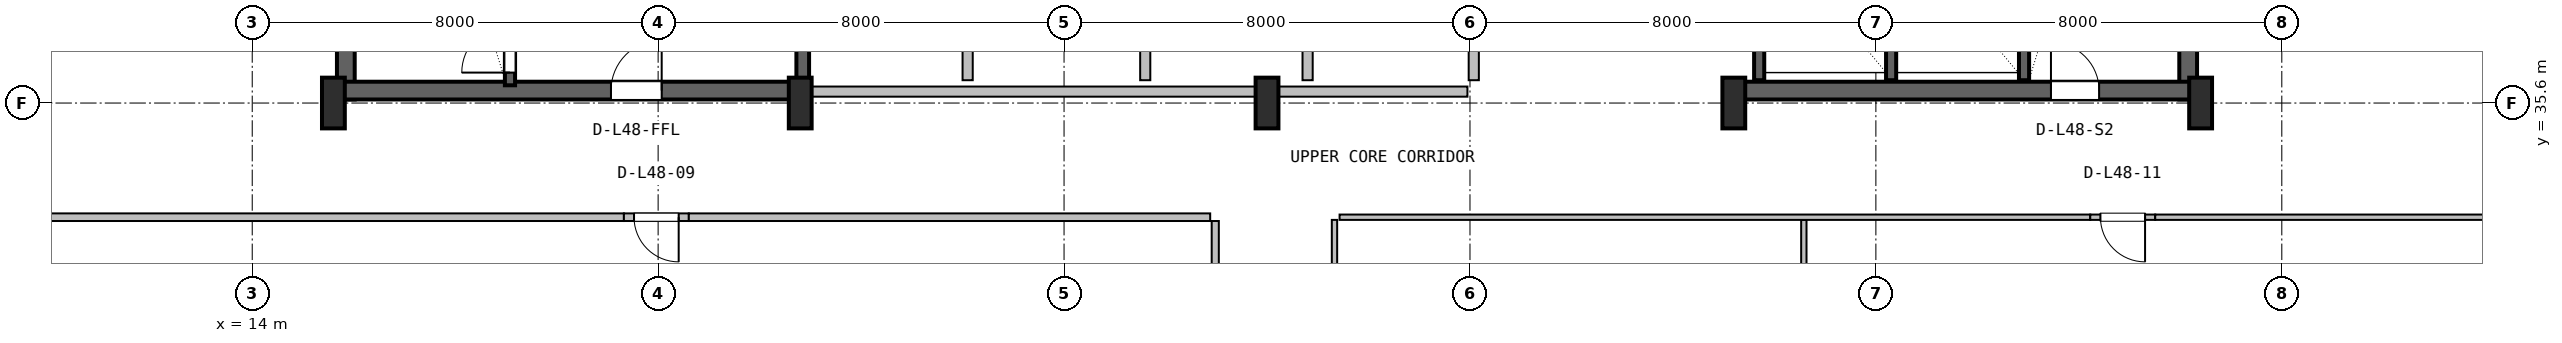
"""IFC4 building model, lengths in metres.
Left out: names, types, materials, properties, quantities, classifications, styles, units other than length and angle.
Written with IfcOpenShell. Run it as: python <this file> out.ifc"""

import sys

from ifc_helpers import new_model, si_unit, direction, frame, frame_2d, origin, origin_2d, place, context, subcontext, project, spatial, rectangle, i_section, extrude, source, transform, mapped, element, fill, save


model = new_model("IFC4")
c1 = context("Model", 3, precision=1e-05, world=origin(), true_north=direction((0.0, 1.0)))
c2 = subcontext(c1, "Body", "Model", "MODEL_VIEW")
j1 = project(units=[si_unit("LENGTHUNIT", "METRE"), si_unit("PLANEANGLEUNIT", "RADIAN")], contexts=[c1])
p1 = place(None, origin())
s1 = spatial("IfcSite", under=j1, at=p1, CompositionType="ELEMENT")
p2 = place(p1, origin())
s2 = spatial("IfcBuilding", under=s1, at=p2, CompositionType="ELEMENT")
p3 = place(p2, frame((0.0, 0.0, 196.0)))
s3 = spatial("IfcBuildingStorey", under=s2, at=p3, CompositionType="ELEMENT", Elevation=196.0)
for number, where, z_axis, x_axis in (
    (1, (15.845, 35.67, 0.0), (0.0, 0.0, 1.0), (0.0, 1.0, 0.0)),
    (2, (52.155, 35.67, 0.0), (0.0, 0.0, 1.0), (0.0, 1.0, 0.0)),
):
    element("IfcWall", number, at=place(p3, frame(where, z_axis=z_axis, x_axis=x_axis)), inside=s3, PredefinedType="SHEAR", context=c2, shape_type="SweptSolid", body=[
        extrude(rectangle(XDim=11.13, YDim=0.35, at=frame_2d((5.565, 0.0))), origin(), (0.0, 0.0, 1.0), 3.55),
    ])
p4 = place(p3, frame((15.67, 35.845, 0.0), z_axis=(0.0, 0.0, 1.0), x_axis=(1.0, 0.0, 0.0)))
e3 = element("IfcWall", 3, at=p4, inside=s3, PredefinedType="SHEAR", context=c2, shape_type="SweptSolid", body=[
    extrude(rectangle(XDim=9.13, YDim=0.35, at=frame_2d((4.565, 0.0))), origin(), (0.0, 0.0, 1.0), 3.55),
])
p5 = place(p4, frame((5.4, 0.0, 0.0)))
e4 = element("IfcOpeningElement", 4, at=p5, cuts=e3, PredefinedType="OPENING", context=c2, shape_type="SweptSolid", body=[
    extrude(rectangle(XDim=1.0, YDim=2.1, at=frame_2d((0.5, 1.05))), frame((0.0, 0.185, 0.0), z_axis=(0.0, -1.0, 0.0), x_axis=(1.0, 0.0, 0.0)), (0.0, 0.0, 1.0), 0.37),
])
p6 = place(p3, frame((43.2, 35.845, 0.0), z_axis=(0.0, 0.0, 1.0), x_axis=(1.0, 0.0, 0.0)))
e5 = element("IfcWall", 5, at=p6, inside=s3, PredefinedType="SHEAR", context=c2, shape_type="SweptSolid", body=[
    extrude(rectangle(XDim=9.13, YDim=0.35, at=frame_2d((4.565, 0.0))), origin(), (0.0, 0.0, 1.0), 3.55),
])
p7 = place(p6, frame((6.25, 0.0, 0.0)))
e6 = element("IfcOpeningElement", 6, at=p7, cuts=e5, PredefinedType="OPENING", context=c2, shape_type="SweptSolid", body=[
    extrude(rectangle(XDim=0.95, YDim=2.1, at=frame_2d((0.475, 1.05))), frame((0.0, 0.185, 0.0), z_axis=(0.0, -1.0, 0.0), x_axis=(1.0, 0.0, 0.0)), (0.0, 0.0, 1.0), 0.37),
])
m1 = source(origin(), c2, "Body", "SweptSolid", [
    extrude(i_section(OverallWidth=0.45, OverallDepth=1.0, WebThickness=0.016, FlangeThickness=0.03, FilletRadius=0.016, at=origin_2d()), origin(), (0.0, 0.0, 1.0), 3.8),
])
for number, where, z_axis, x_axis in (
    (7, (15.6, 35.6, 0.0), (0.0, 0.0, 1.0), (1.0, 0.0, 0.0)),
    (8, (24.8, 35.6, 0.0), (0.0, 0.0, 1.0), (1.0, 0.0, 0.0)),
    (9, (34.0, 35.6, 0.0), (0.0, 0.0, 1.0), (1.0, 0.0, 0.0)),
    (10, (43.2, 35.6, 0.0), (0.0, 0.0, 1.0), (1.0, 0.0, 0.0)),
    (11, (52.4, 35.6, 0.0), (0.0, 0.0, 1.0), (1.0, 0.0, 0.0)),
):
    element("IfcColumn", number, at=place(p3, frame(where, z_axis=z_axis, x_axis=x_axis)), inside=s3, PredefinedType="COLUMN", context=c2, shape_type="MappedRepresentation", body=[
        mapped(m1, transform((0.0, 0.0, 0.0), x_axis=(1.0, 0.0, 0.0), y_axis=(0.0, 1.0, 0.0), z_axis=(0.0, 0.0, 1.0), scale=1.0)),
    ])
p8 = place(p3, frame((19.08, 35.95, 0.0), z_axis=(0.0, 0.0, 1.0), x_axis=(0.0, 1.0, 0.0)))
e12 = element("IfcWall", 12, at=p8, inside=s3, PredefinedType="SHEAR", context=c2, shape_type="SweptSolid", body=[
    extrude(rectangle(XDim=9.65, YDim=0.2, at=frame_2d((4.825, 0.0))), origin(), (0.0, 0.0, 1.0), 3.55),
])
p9 = place(p8, frame((0.25, 0.0, 0.0)))
e13 = element("IfcOpeningElement", 13, at=p9, cuts=e12, PredefinedType="OPENING", context=c2, shape_type="SweptSolid", body=[
    extrude(rectangle(XDim=0.95, YDim=2.1, at=frame_2d((0.475, 1.05))), frame((0.0, 0.11, 0.0), z_axis=(0.0, -1.0, 0.0), x_axis=(1.0, 0.0, 0.0)), (0.0, 0.0, 1.0), 0.22),
])
p10 = place(p3, frame((24.85, 36.05, 0.0), z_axis=(0.0, 0.0, 1.0), x_axis=(0.0, 1.0, 0.0)))
e14 = element("IfcWall", 14, at=p10, inside=s3, PredefinedType="SHEAR", context=c2, shape_type="SweptSolid", body=[
    extrude(rectangle(XDim=10.45, YDim=0.25, at=frame_2d((5.225, 0.0))), origin(), (0.0, 0.0, 1.0), 3.55),
])
p11 = place(p3, frame((48.92, 36.05, 0.0), z_axis=(0.0, 0.0, 1.0), x_axis=(0.0, 1.0, 0.0)))
e15 = element("IfcWall", 15, at=p11, inside=s3, PredefinedType="SHEAR", context=c2, shape_type="SweptSolid", body=[
    extrude(rectangle(XDim=10.5, YDim=0.2, at=frame_2d((5.25, 0.0))), origin(), (0.0, 0.0, 1.0), 3.55),
])
for number, where, z_axis, x_axis in (
    (16, (43.7, 36.05, 0.0), (0.0, 0.0, 1.0), (0.0, 1.0, 0.0)),
    (17, (46.3, 36.05, 0.0), (0.0, 0.0, 1.0), (0.0, 1.0, 0.0)),
):
    element("IfcWall", number, at=place(p3, frame(where, z_axis=z_axis, x_axis=x_axis)), inside=s3, PredefinedType="SHEAR", context=c2, shape_type="SweptSolid", body=[
        extrude(rectangle(XDim=3.05, YDim=0.2, at=frame_2d((1.525, 0.0))), origin(), (0.0, 0.0, 1.0), 3.55),
    ])
p12 = place(p3, frame((25.0, 35.825, 0.0), z_axis=(0.0, 0.0, 1.0), x_axis=(1.0, 0.0, 0.0)))
e18 = element("IfcWall", 18, at=p12, inside=s3, PredefinedType="SOLIDWALL", context=c2, shape_type="SweptSolid", body=[
    extrude(rectangle(XDim=12.95, YDim=0.2, at=frame_2d((6.475, 0.0))), origin(), (0.0, 0.0, 1.0), 2.575),
])
for number, where, z_axis, x_axis in (
    (19, (28.1, 36.05, 0.0), (0.0, 0.0, 1.0), (0.0, 1.0, 0.0)),
    (20, (31.6, 36.05, 0.0), (0.0, 0.0, 1.0), (0.0, 1.0, 0.0)),
):
    element("IfcWall", number, at=place(p3, frame(where, z_axis=z_axis, x_axis=x_axis)), inside=s3, PredefinedType="PLUMBINGWALL", context=c2, shape_type="SweptSolid", body=[
        extrude(rectangle(XDim=3.1, YDim=0.2, at=frame_2d((1.55, 0.0))), origin(), (0.0, 0.0, 1.0), 3.53),
    ])
for number, where, z_axis, x_axis in (
    (21, (34.8, 36.05, 0.0), (0.0, 0.0, 1.0), (0.0, 1.0, 0.0)),
    (22, (38.075, 36.05, 0.0), (0.0, 0.0, 1.0), (0.0, 1.0, 0.0)),
):
    element("IfcWall", number, at=place(p3, frame(where, z_axis=z_axis, x_axis=x_axis)), inside=s3, PredefinedType="SOLIDWALL", context=c2, shape_type="SweptSolid", body=[
        extrude(rectangle(XDim=3.1, YDim=0.2, at=frame_2d((1.55, 0.0))), origin(), (0.0, 0.0, 1.0), 3.53),
    ])
p13 = place(p3, frame((32.98, 16.38, 0.0), z_axis=(0.0, 0.0, 1.0), x_axis=(0.0, 1.0, 0.0)))
e23 = element("IfcWall", 23, at=p13, inside=s3, PredefinedType="PARTITIONING", context=c2, shape_type="SweptSolid", body=[
    extrude(rectangle(XDim=16.895, YDim=0.14, at=frame_2d((8.448, 0.0))), origin(), (0.0, 0.0, 1.0), 1.925),
])
p14 = place(p3, frame((7.18, 33.35, 0.0), z_axis=(0.0, 0.0, 1.0), x_axis=(1.0, 0.0, 0.0)))
e24 = element("IfcWall", 24, at=p14, inside=s3, PredefinedType="PARTITIONING", context=c2, shape_type="SweptSolid", body=[
    extrude(rectangle(XDim=14.145, YDim=0.15, at=frame_2d((7.073, 0.0))), origin(), (0.0, 0.0, 1.0), 1.925),
])
p15 = place(p3, frame((21.325, 33.35, 0.0), z_axis=(0.0, 0.0, 1.0), x_axis=(1.0, 0.0, 0.0)))
e25 = element("IfcWall", 25, at=p15, inside=s3, PredefinedType="PARTITIONING", context=c2, shape_type="SweptSolid", body=[
    extrude(rectangle(XDim=1.28, YDim=0.15, at=frame_2d((0.64, 0.0))), origin(), (0.0, 0.0, 1.0), 3.53),
])
p16 = place(p15, frame((0.2, 0.0, 0.0)))
e26 = element("IfcOpeningElement", 26, at=p16, cuts=e25, PredefinedType="OPENING", context=c2, shape_type="SweptSolid", body=[
    extrude(rectangle(XDim=0.88, YDim=2.06, at=frame_2d((0.44, 1.03))), frame((0.0, 0.085, 0.0), z_axis=(0.0, -1.0, 0.0), x_axis=(1.0, 0.0, 0.0)), (0.0, 0.0, 1.0), 0.17),
])
p17 = place(p3, frame((22.605, 33.35, 0.0), z_axis=(0.0, 0.0, 1.0), x_axis=(1.0, 0.0, 0.0)))
e27 = element("IfcWall", 27, at=p17, inside=s3, PredefinedType="PARTITIONING", context=c2, shape_type="SweptSolid", body=[
    extrude(rectangle(XDim=10.275, YDim=0.15, at=frame_2d((5.137, 0.0))), origin(), (0.0, 0.0, 1.0), 2.195),
])
p18 = place(p3, frame((44.58, 7.38, 0.0), z_axis=(0.0, 0.0, 1.0), x_axis=(0.0, 1.0, 0.0)))
e28 = element("IfcWall", 28, at=p18, inside=s3, PredefinedType="PARTITIONING", context=c2, shape_type="SweptSolid", body=[
    extrude(rectangle(XDim=25.917, YDim=0.105, at=frame_2d((12.958, 0.0))), origin(), (0.0, 0.0, 1.0), 1.925),
])
p19 = place(p3, frame((35.43, 33.35, 0.0), z_axis=(0.0, 0.0, 1.0), x_axis=(1.0, 0.0, 0.0)))
e29 = element("IfcWall", 29, at=p19, inside=s3, PredefinedType="PARTITIONING", context=c2, shape_type="SweptSolid", body=[
    extrude(rectangle(XDim=14.795, YDim=0.105, at=frame_2d((7.397, 0.0))), origin(), (0.0, 0.0, 1.0), 2.195),
])
p20 = place(p3, frame((50.225, 33.35, 0.0), z_axis=(0.0, 0.0, 1.0), x_axis=(1.0, 0.0, 0.0)))
e30 = element("IfcWall", 30, at=p20, inside=s3, PredefinedType="PARTITIONING", context=c2, shape_type="SweptSolid", body=[
    extrude(rectangle(XDim=1.28, YDim=0.105, at=frame_2d((0.64, 0.0))), origin(), (0.0, 0.0, 1.0), 2.195),
])
p21 = place(p20, frame((0.2, 0.0, 0.0)))
e31 = element("IfcOpeningElement", 31, at=p21, cuts=e30, PredefinedType="OPENING", context=c2, shape_type="SweptSolid", body=[
    extrude(rectangle(XDim=0.88, YDim=2.06, at=frame_2d((0.44, 1.03))), frame((0.0, 0.062, 0.0), z_axis=(0.0, -1.0, 0.0), x_axis=(1.0, 0.0, 0.0)), (0.0, 0.0, 1.0), 0.125),
])
p22 = place(p3, frame((51.505, 33.35, 0.0), z_axis=(0.0, 0.0, 1.0), x_axis=(1.0, 0.0, 0.0)))
e32 = element("IfcWall", 32, at=p22, inside=s3, PredefinedType="PARTITIONING", context=c2, shape_type="SweptSolid", body=[
    extrude(rectangle(XDim=9.315, YDim=0.105, at=frame_2d((4.658, 0.0))), origin(), (0.0, 0.0, 1.0), 1.925),
])
p23 = place(p3, frame((35.33, 21.46, 0.0), z_axis=(0.0, 0.0, 1.0), x_axis=(0.0, 1.0, 0.0)))
e33 = element("IfcWall", 33, at=p23, inside=s3, PredefinedType="PARTITIONING", context=c2, shape_type="SweptSolid", body=[
    extrude(rectangle(XDim=11.837, YDim=0.105, at=frame_2d((5.918, 0.0))), origin(), (0.0, 0.0, 1.0), 1.925),
])
m2 = source(origin(), c2, "Body", "SweptSolid", [
    extrude(rectangle(XDim=0.95, YDim=2.1, at=frame_2d((0.475, 1.05))), frame((0.0, 0.025, 0.0), z_axis=(0.0, -1.0, 0.0), x_axis=(1.0, 0.0, 0.0)), (0.0, 0.0, 1.0), 0.05),
])
p24 = place(p9, origin())
e34 = element("IfcDoor", 34, at=p24, inside=s3, OperationType="SINGLE_SWING_LEFT", PredefinedType="DOOR", context=c2, shape_type="MappedRepresentation", body=[
    mapped(m2, transform((0.0, 0.0, 0.0), x_axis=(1.0, 0.0, 0.0), y_axis=(0.0, 1.0, 0.0), z_axis=(0.0, 0.0, 1.0), scale=1.0)),
])
fill(e13, e34)
m3 = source(origin(), c2, "Body", "SweptSolid", [
    extrude(rectangle(XDim=1.0, YDim=2.1, at=frame_2d((0.5, 1.05))), frame((0.0, 0.025, 0.0), z_axis=(0.0, -1.0, 0.0), x_axis=(1.0, 0.0, 0.0)), (0.0, 0.0, 1.0), 0.05),
])
p25 = place(p5, origin())
e35 = element("IfcDoor", 35, at=p25, inside=s3, OperationType="SINGLE_SWING_RIGHT", PredefinedType="DOOR", context=c2, shape_type="MappedRepresentation", body=[
    mapped(m3, transform((0.0, 0.0, 0.0), x_axis=(1.0, 0.0, 0.0), y_axis=(0.0, 1.0, 0.0), z_axis=(0.0, 0.0, 1.0), scale=1.0)),
])
fill(e4, e35)
p26 = place(p7, origin())
e36 = element("IfcDoor", 36, at=p26, inside=s3, OperationType="SINGLE_SWING_LEFT", PredefinedType="DOOR", context=c2, shape_type="MappedRepresentation", body=[
    mapped(m2, transform((0.0, 0.0, 0.0), x_axis=(1.0, 0.0, 0.0), y_axis=(0.0, 1.0, 0.0), z_axis=(0.0, 0.0, 1.0), scale=1.0)),
])
fill(e6, e36)
m4 = source(origin(), c2, "Body", "SweptSolid", [
    extrude(rectangle(XDim=0.88, YDim=2.06, at=frame_2d((0.44, 1.03))), frame((0.0, 0.025, 0.0), z_axis=(0.0, -1.0, 0.0), x_axis=(1.0, 0.0, 0.0)), (0.0, 0.0, 1.0), 0.05),
])
p27 = place(p16, frame((0.88, 0.0, 0.0), z_axis=(0.0, 0.0, 1.0), x_axis=(-1.0, 0.0, 0.0)))
e37 = element("IfcDoor", 37, at=p27, inside=s3, OperationType="SINGLE_SWING_RIGHT", PredefinedType="DOOR", context=c2, shape_type="MappedRepresentation", body=[
    mapped(m4, transform((0.0, 0.0, 0.0), x_axis=(1.0, 0.0, 0.0), y_axis=(0.0, 1.0, 0.0), z_axis=(0.0, 0.0, 1.0), scale=1.0)),
])
fill(e26, e37)
p28 = place(p21, frame((0.88, 0.0, 0.0), z_axis=(0.0, 0.0, 1.0), x_axis=(-1.0, 0.0, 0.0)))
e38 = element("IfcDoor", 38, at=p28, inside=s3, OperationType="SINGLE_SWING_RIGHT", PredefinedType="DOOR", context=c2, shape_type="MappedRepresentation", body=[
    mapped(m4, transform((0.0, 0.0, 0.0), x_axis=(1.0, 0.0, 0.0), y_axis=(0.0, 1.0, 0.0), z_axis=(0.0, 0.0, 1.0), scale=1.0)),
])
fill(e31, e38)
save(model, sys.argv[1])
